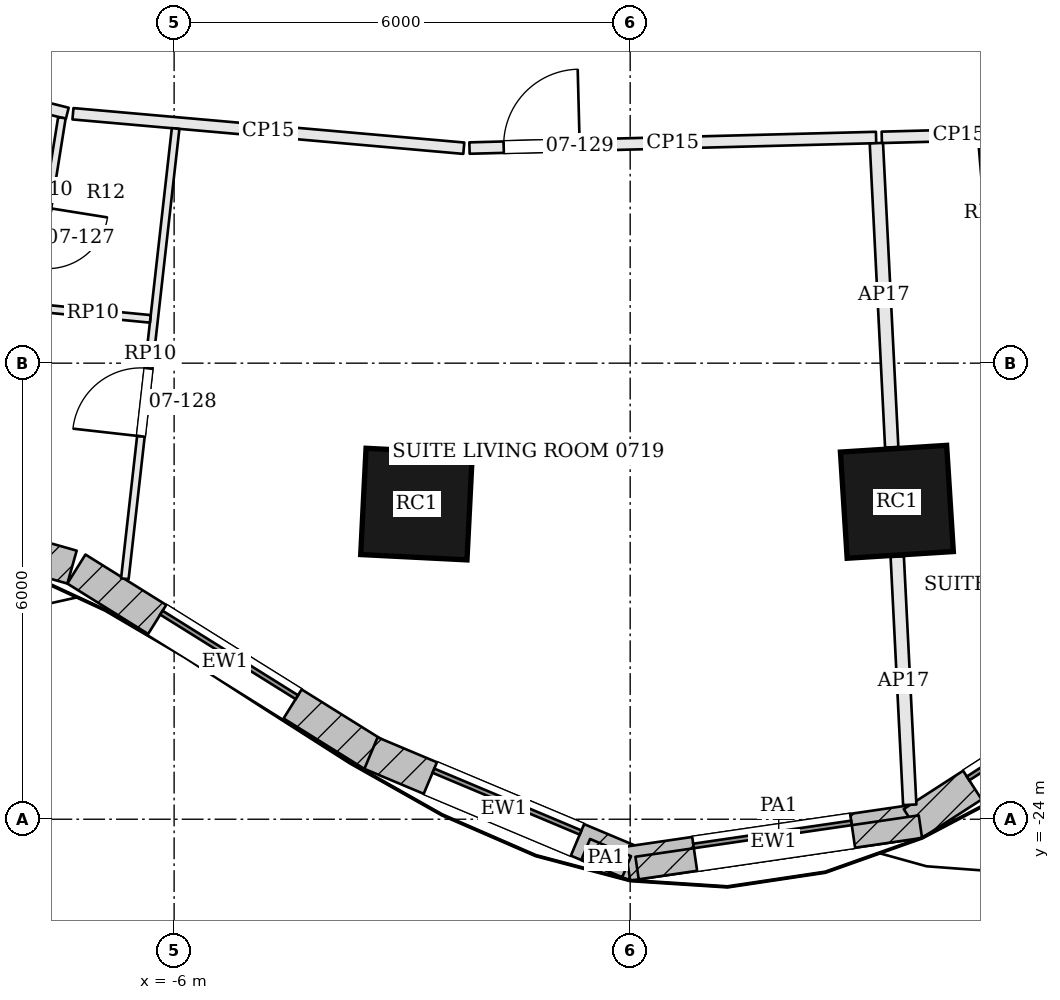
"""IFC4 building model, lengths in metres.
Left out: names, types, materials, properties, quantities, classifications, styles, units other than length and angle.
Written with IfcOpenShell. Run it as: python <this file> out.ifc"""

import sys

from ifc_helpers import new_model, si_unit, direction, frame, frame_2d, origin, origin_2d, place, context, subcontext, project, spatial, rectangle, extrude, element, fill, save


model = new_model("IFC4")
c1 = context("Model", 3, precision=1e-05, world=origin(), true_north=direction((0.0, 1.0)))
c2 = subcontext(c1, "Body", "Model", "MODEL_VIEW")
j1 = project(units=[si_unit("LENGTHUNIT", "METRE"), si_unit("PLANEANGLEUNIT", "RADIAN")], contexts=[c1])
p1 = place(None, origin())
s1 = spatial("IfcSite", under=j1, at=p1, CompositionType="ELEMENT")
p2 = place(p1, origin())
s2 = spatial("IfcBuilding", under=s1, at=p2, CompositionType="ELEMENT")
p3 = place(p2, frame((0.0, 0.0, 41.1)))
s3 = spatial("IfcBuildingStorey", under=s2, at=p3, CompositionType="ELEMENT", Elevation=41.1)
for number, where, z_axis, x_axis in (
    (1, (-2.811, -19.854, 0.0), (0.0, 0.0, 1.0), (0.999, -0.05, 0.0)),
    (2, (3.509, -19.824, 0.0), (0.0, 0.0, 1.0), (0.998, 0.063, 0.0)),
):
    element("IfcColumn", number, at=place(p3, frame(where, z_axis=z_axis, x_axis=x_axis)), inside=s3, PredefinedType="COLUMN", context=c2, shape_type="SweptSolid", body=[
        extrude(rectangle(XDim=1.4, YDim=1.4, at=origin_2d()), origin(), (0.0, 0.0, 1.0), 3.6),
    ])
p4 = place(p3, frame((-10.063, -19.911, 0.0), z_axis=(0.0, 0.0, 1.0), x_axis=(0.961982029567, -0.273112751057, 0.0)))
e3 = element("IfcWall", 3, at=p4, inside=s3, PredefinedType="SOLIDWALL", context=c2, shape_type="SweptSolid", body=[
    extrude(rectangle(XDim=2.827, YDim=0.45, at=frame_2d((1.414, 0.0))), origin(), (0.0, 0.0, 1.0), 3.4),
])
p5 = place(p4, frame((0.364, 0.0, 0.9)))
e4 = element("IfcOpeningElement", 4, at=p5, cuts=e3, PredefinedType="OPENING", context=c2, shape_type="SweptSolid", body=[
    extrude(rectangle(XDim=2.1, YDim=2.0, at=frame_2d((1.05, 1.0))), frame((0.0, 0.235, 0.0), z_axis=(0.0, -1.0, 0.0), x_axis=(1.0, 0.0, 0.0)), (0.0, 0.0, 1.0), 0.47),
])
p6 = place(p3, frame((-7.286, -20.708, 0.0), z_axis=(0.0, 0.0, 1.0), x_axis=(0.848420894374, -0.529322194878, 0.0)))
e5 = element("IfcWall", 5, at=p6, inside=s3, PredefinedType="SOLIDWALL", context=c2, shape_type="SweptSolid", body=[
    extrude(rectangle(XDim=4.606, YDim=0.45, at=frame_2d((2.303, 0.0))), origin(), (0.0, 0.0, 1.0), 3.4),
])
p7 = place(p6, frame((1.253, 0.0, 0.9)))
e6 = element("IfcOpeningElement", 6, at=p7, cuts=e5, PredefinedType="OPENING", context=c2, shape_type="SweptSolid", body=[
    extrude(rectangle(XDim=2.1, YDim=2.0, at=frame_2d((1.05, 1.0))), frame((0.0, 0.235, 0.0), z_axis=(0.0, -1.0, 0.0), x_axis=(1.0, 0.0, 0.0)), (0.0, 0.0, 1.0), 0.47),
])
p8 = place(p3, frame((-3.41, -23.13, 0.0), z_axis=(0.0, 0.0, 1.0), x_axis=(0.921914994676, -0.387392233521, 0.0)))
e7 = element("IfcWall", 7, at=p8, inside=s3, PredefinedType="SOLIDWALL", context=c2, shape_type="SweptSolid", body=[
    extrude(rectangle(XDim=3.793, YDim=0.45, at=frame_2d((1.896, 0.0))), origin(), (0.0, 0.0, 1.0), 3.4),
])
p9 = place(p8, frame((0.847, 0.0, 0.9)))
e8 = element("IfcOpeningElement", 8, at=p9, cuts=e7, PredefinedType="OPENING", context=c2, shape_type="SweptSolid", body=[
    extrude(rectangle(XDim=2.1, YDim=2.0, at=frame_2d((1.05, 1.0))), frame((0.0, 0.235, 0.0), z_axis=(0.0, -1.0, 0.0), x_axis=(1.0, 0.0, 0.0)), (0.0, 0.0, 1.0), 0.47),
])
p10 = place(p3, frame((-0.032, -24.584, 0.0), z_axis=(0.0, 0.0, 1.0), x_axis=(0.989495330387, 0.144564833698, 0.0)))
e9 = element("IfcWall", 9, at=p10, inside=s3, PredefinedType="SOLIDWALL", context=c2, shape_type="SweptSolid", body=[
    extrude(rectangle(XDim=3.881, YDim=0.45, at=frame_2d((1.94, 0.0))), origin(), (0.0, 0.0, 1.0), 3.4),
])
p11 = place(p10, frame((0.89, 0.0, 0.9)))
e10 = element("IfcOpeningElement", 10, at=p11, cuts=e9, PredefinedType="OPENING", context=c2, shape_type="SweptSolid", body=[
    extrude(rectangle(XDim=2.1, YDim=2.0, at=frame_2d((1.05, 1.0))), frame((0.0, 0.235, 0.0), z_axis=(0.0, -1.0, 0.0), x_axis=(1.0, 0.0, 0.0)), (0.0, 0.0, 1.0), 0.47),
])
p12 = place(p3, frame((3.721, -24.055, 0.0), z_axis=(0.0, 0.0, 1.0), x_axis=(0.840404438766, 0.54195975801, 0.0)))
e11 = element("IfcWall", 11, at=p12, inside=s3, PredefinedType="SOLIDWALL", context=c2, shape_type="SweptSolid", body=[
    extrude(rectangle(XDim=3.96, YDim=0.45, at=frame_2d((1.98, 0.0))), origin(), (0.0, 0.0, 1.0), 3.4),
])
p13 = place(p12, frame((0.93, 0.0, 0.9)))
e12 = element("IfcOpeningElement", 12, at=p13, cuts=e11, PredefinedType="OPENING", context=c2, shape_type="SweptSolid", body=[
    extrude(rectangle(XDim=2.1, YDim=2.0, at=frame_2d((1.05, 1.0))), frame((0.0, 0.235, 0.0), z_axis=(0.0, -1.0, 0.0), x_axis=(1.0, 0.0, 0.0)), (0.0, 0.0, 1.0), 0.47),
])
p14 = place(p3, frame((-0.586, -24.398, 3.6), z_axis=(0.0, 0.0, 1.0), x_axis=(0.921949320844, -0.387310534062, 0.0)))
e13 = element("IfcWall", 13, at=p14, inside=s3, PredefinedType="PARAPET", context=c2, shape_type="SweptSolid", body=[
    extrude(rectangle(XDim=0.585, YDim=0.3, at=frame_2d((0.292, 0.0))), origin(), (0.0, 0.0, 1.0), 1.1),
])
p15 = place(p3, frame((0.091, -24.642, 3.6), z_axis=(0.0, 0.0, 1.0), x_axis=(0.989502691406, 0.144514441145, 0.0)))
e14 = element("IfcWall", 14, at=p15, inside=s3, PredefinedType="PARAPET", context=c2, shape_type="SweptSolid", body=[
    extrude(rectangle(XDim=3.767, YDim=0.3, at=frame_2d((1.884, 0.0))), origin(), (0.0, 0.0, 1.0), 1.1),
])
p16 = place(p3, frame((-9.152, -14.274, 0.0), z_axis=(0.0, 0.0, 1.0), x_axis=(0.969966784833, -0.243237407323, 0.0)))
e15 = element("IfcWall", 15, at=p16, inside=s3, PredefinedType="PARTITIONING", context=c2, shape_type="SweptSolid", body=[
    extrude(rectangle(XDim=1.801, YDim=0.15, at=frame_2d((0.9, 0.0))), origin(), (0.0, 0.0, 1.0), 2.68),
])
p17 = place(p3, frame((-7.331, -14.719, 0.0), z_axis=(0.0, 0.0, 1.0), x_axis=(0.996139466017, -0.087784760882, 0.0)))
e16 = element("IfcWall", 16, at=p17, inside=s3, PredefinedType="PARTITIONING", context=c2, shape_type="SweptSolid", body=[
    extrude(rectangle(XDim=5.162, YDim=0.15, at=frame_2d((2.581, 0.0))), origin(), (0.0, 0.0, 1.0), 2.68),
])
p18 = place(p3, frame((-2.114, -15.17, 0.0), z_axis=(0.0, 0.0, 1.0), x_axis=(0.99966176809, 0.02600671875, 0.0)))
e17 = element("IfcWall", 17, at=p18, inside=s3, PredefinedType="PARTITIONING", context=c2, shape_type="SweptSolid", body=[
    extrude(rectangle(XDim=5.351, YDim=0.15, at=frame_2d((2.675, 0.0))), origin(), (0.0, 0.0, 1.0), 2.68),
])
p19 = place(p18, frame((0.45, 0.0, 0.0)))
e18 = element("IfcOpeningElement", 18, at=p19, cuts=e17, PredefinedType="OPENING", context=c2, shape_type="SweptSolid", body=[
    extrude(rectangle(XDim=1.0, YDim=2.1, at=frame_2d((0.5, 1.05))), frame((0.0, 0.085, 0.0), z_axis=(0.0, -1.0, 0.0), x_axis=(1.0, 0.0, 0.0)), (0.0, 0.0, 1.0), 0.17),
])
p20 = place(p3, frame((3.678, -23.81, 0.0), z_axis=(0.0, 0.0, 1.0), x_axis=(-0.050406902628, 0.998728764063, 0.0)))
e19 = element("IfcWall", 19, at=p20, inside=s3, PredefinedType="PARTITIONING", context=c2, shape_type="SweptSolid", body=[
    extrude(rectangle(XDim=3.269, YDim=0.175, at=frame_2d((1.635, 0.0))), origin(), (0.0, 0.0, 1.0), 2.68),
])
p21 = place(p3, frame((3.441, -19.107, 0.0), z_axis=(0.0, 0.0, 1.0), x_axis=(-0.050399621173, 0.998729131539, 0.0)))
e20 = element("IfcWall", 20, at=p21, inside=s3, PredefinedType="PARTITIONING", context=c2, shape_type="SweptSolid", body=[
    extrude(rectangle(XDim=4.006, YDim=0.175, at=frame_2d((2.003, 0.0))), origin(), (0.0, 0.0, 1.0), 2.68),
])
p22 = place(p3, frame((3.31, -15.029, 0.0), z_axis=(0.0, 0.0, 1.0), x_axis=(0.99966219628, 0.025990254501, 0.0)))
e21 = element("IfcWall", 21, at=p22, inside=s3, PredefinedType="PARTITIONING", context=c2, shape_type="SweptSolid", body=[
    extrude(rectangle(XDim=2.029, YDim=0.15, at=frame_2d((1.015, 0.0))), origin(), (0.0, 0.0, 1.0), 2.68),
])
p23 = place(p3, frame((-6.648, -20.836, 0.0), z_axis=(0.0, 0.0, 1.0), x_axis=(0.11205867427, 0.993701591787, 0.0)))
e22 = element("IfcWall", 22, at=p23, inside=s3, PredefinedType="PARTITIONING", context=c2, shape_type="SweptSolid", body=[
    extrude(rectangle(XDim=5.961, YDim=0.1, at=frame_2d((2.98, 0.0))), origin(), (0.0, 0.0, 1.0), 2.68),
])
p24 = place(p23, frame((1.886, 0.0, 0.0)))
e23 = element("IfcOpeningElement", 23, at=p24, cuts=e22, PredefinedType="OPENING", context=c2, shape_type="SweptSolid", body=[
    extrude(rectangle(XDim=0.9, YDim=2.4, at=frame_2d((0.45, 1.2))), frame((0.0, 0.06, 0.0), z_axis=(0.0, -1.0, 0.0), x_axis=(1.0, 0.0, 0.0)), (0.0, 0.0, 1.0), 0.12),
])
p25 = place(p3, frame((-7.476, -14.771, 0.0), z_axis=(0.0, 0.0, 1.0), x_axis=(-0.15770012492, -0.98748704832, 0.0)))
e24 = element("IfcWall", 24, at=p25, inside=s3, PredefinedType="PARTITIONING", context=c2, shape_type="SweptSolid", body=[
    extrude(rectangle(XDim=2.525, YDim=0.1, at=frame_2d((1.262, 0.0))), origin(), (0.0, 0.0, 1.0), 2.68),
])
p26 = place(p25, frame((1.2, 0.0, 0.0)))
e25 = element("IfcOpeningElement", 25, at=p26, cuts=e24, PredefinedType="OPENING", context=c2, shape_type="SweptSolid", body=[
    extrude(rectangle(XDim=0.8, YDim=2.1, at=frame_2d((0.4, 1.05))), frame((0.0, 0.06, 0.0), z_axis=(0.0, -1.0, 0.0), x_axis=(1.0, 0.0, 0.0)), (0.0, 0.0, 1.0), 0.12),
])
p27 = place(p3, frame((-7.825, -17.27, 0.0), z_axis=(0.0, 0.0, 1.0), x_axis=(0.995291668022, -0.096925206043, 0.0)))
e26 = element("IfcWall", 26, at=p27, inside=s3, PredefinedType="PARTITIONING", context=c2, shape_type="SweptSolid", body=[
    extrude(rectangle(XDim=1.519, YDim=0.1, at=frame_2d((0.759, 0.0))), origin(), (0.0, 0.0, 1.0), 2.68),
])
p28 = place(p3, frame((4.63, -15.07, 0.0), z_axis=(0.0, 0.0, 1.0), x_axis=(0.08247732406, -0.996592941484, 0.0)))
e27 = element("IfcWall", 27, at=p28, inside=s3, PredefinedType="PARTITIONING", context=c2, shape_type="SweptSolid", body=[
    extrude(rectangle(XDim=2.525, YDim=0.1, at=frame_2d((1.262, 0.0))), origin(), (0.0, 0.0, 1.0), 2.68),
])
p29 = place(p28, frame((1.2, 0.0, 0.0)))
e28 = element("IfcOpeningElement", 28, at=p29, cuts=e27, PredefinedType="OPENING", context=c2, shape_type="SweptSolid", body=[
    extrude(rectangle(XDim=0.8, YDim=2.1, at=frame_2d((0.4, 1.05))), frame((0.0, 0.06, 0.0), z_axis=(0.0, -1.0, 0.0), x_axis=(1.0, 0.0, 0.0)), (0.0, 0.0, 1.0), 0.12),
])
p30 = place(p7, origin())
e29 = element("IfcWindow", 29, at=p30, inside=s3, PartitioningType="SINGLE_PANEL", PredefinedType="WINDOW", context=c2, shape_type="SweptSolid", body=[
    extrude(rectangle(XDim=2.1, YDim=2.0, at=frame_2d((1.05, 1.0))), frame((0.0, 0.135, 0.0), z_axis=(0.0, -1.0, 0.0), x_axis=(1.0, 0.0, 0.0)), (0.0, 0.0, 1.0), 0.06),
])
fill(e6, e29)
p31 = place(p9, origin())
e30 = element("IfcWindow", 30, at=p31, inside=s3, PartitioningType="SINGLE_PANEL", PredefinedType="WINDOW", context=c2, shape_type="SweptSolid", body=[
    extrude(rectangle(XDim=2.1, YDim=2.0, at=frame_2d((1.05, 1.0))), frame((0.0, 0.135, 0.0), z_axis=(0.0, -1.0, 0.0), x_axis=(1.0, 0.0, 0.0)), (0.0, 0.0, 1.0), 0.06),
])
fill(e8, e30)
p32 = place(p11, origin())
e31 = element("IfcWindow", 31, at=p32, inside=s3, PartitioningType="SINGLE_PANEL", PredefinedType="WINDOW", context=c2, shape_type="SweptSolid", body=[
    extrude(rectangle(XDim=2.1, YDim=2.0, at=frame_2d((1.05, 1.0))), frame((0.0, 0.135, 0.0), z_axis=(0.0, -1.0, 0.0), x_axis=(1.0, 0.0, 0.0)), (0.0, 0.0, 1.0), 0.06),
])
fill(e10, e31)
p33 = place(p13, origin())
e32 = element("IfcWindow", 32, at=p33, inside=s3, PartitioningType="SINGLE_PANEL", PredefinedType="WINDOW", context=c2, shape_type="SweptSolid", body=[
    extrude(rectangle(XDim=2.1, YDim=2.0, at=frame_2d((1.05, 1.0))), frame((0.0, 0.135, 0.0), z_axis=(0.0, -1.0, 0.0), x_axis=(1.0, 0.0, 0.0)), (0.0, 0.0, 1.0), 0.06),
])
fill(e12, e32)
p34 = place(p24, origin())
e33 = element("IfcDoor", 33, at=p34, inside=s3, OperationType="SINGLE_SWING_LEFT", PredefinedType="DOOR", context=c2, shape_type="SweptSolid", body=[
    extrude(rectangle(XDim=0.9, YDim=2.4, at=frame_2d((0.45, 1.2))), frame((0.0, 0.025, 0.0), z_axis=(0.0, -1.0, 0.0), x_axis=(1.0, 0.0, 0.0)), (0.0, 0.0, 1.0), 0.05),
])
fill(e23, e33)
p35 = place(p19, origin())
e34 = element("IfcDoor", 34, at=p35, inside=s3, OperationType="SINGLE_SWING_RIGHT", PredefinedType="DOOR", context=c2, shape_type="SweptSolid", body=[
    extrude(rectangle(XDim=1.0, YDim=2.1, at=frame_2d((0.5, 1.05))), frame((0.0, 0.025, 0.0), z_axis=(0.0, -1.0, 0.0), x_axis=(1.0, 0.0, 0.0)), (0.0, 0.0, 1.0), 0.05),
])
fill(e18, e34)
save(model, sys.argv[1])
